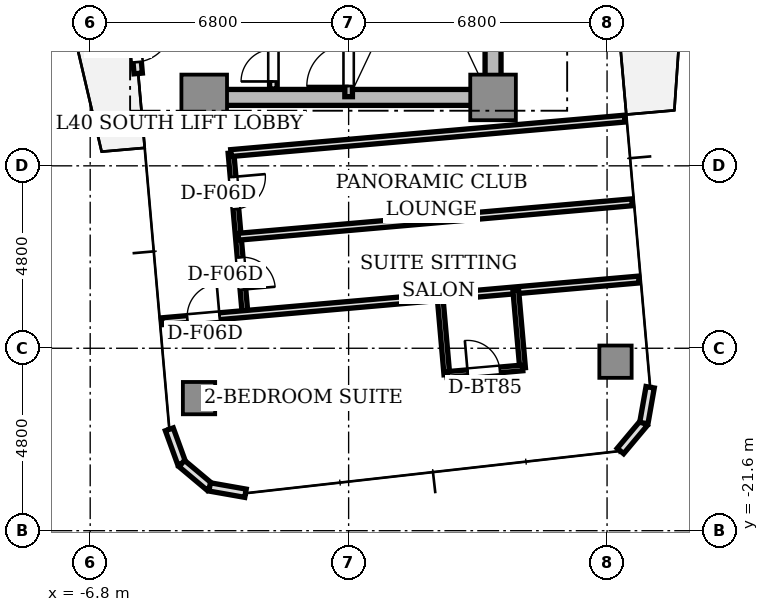
"""IFC4 building model, lengths in metres.
Left out: names, types, materials, properties, quantities, classifications, styles, units other than length and angle.
Written with IfcOpenShell. Run it as: python <this file> out.ifc"""

import sys

from ifc_helpers import new_model, si_unit, direction, frame, frame_2d, origin, origin_2d, place, context, subcontext, project, spatial, rectangle, extrude, source, transform, mapped, element, fill, save


model = new_model("IFC4")
c1 = context("Model", 3, precision=1e-05, world=origin(), true_north=direction((0.0, 1.0)))
c2 = subcontext(c1, "Body", "Model", "MODEL_VIEW")
j1 = project(units=[si_unit("LENGTHUNIT", "METRE"), si_unit("PLANEANGLEUNIT", "RADIAN")], contexts=[c1])
p1 = place(None, origin())
s1 = spatial("IfcSite", under=j1, at=p1, CompositionType="ELEMENT")
p2 = place(p1, origin())
s2 = spatial("IfcBuilding", under=s1, at=p2, CompositionType="ELEMENT")
p3 = place(p2, frame((0.0, 0.0, 147.25)))
s3 = spatial("IfcBuildingStorey", under=s2, at=p3, CompositionType="ELEMENT", Elevation=147.25)
p4 = place(p3, frame((-3.55, -10.2, 0.0), z_axis=(0.0, 0.0, 1.0), x_axis=(1.0, 0.0, 0.0)))
e1 = element("IfcWall", 1, at=p4, inside=s3, PredefinedType="SHEAR", context=c2, shape_type="SweptSolid", body=[
    extrude(rectangle(XDim=7.1, YDim=0.42, at=frame_2d((3.55, 0.0))), origin(), (0.0, 0.0, 1.0), 3.11),
])
p5 = place(p3, frame((3.8, -9.75, 0.0), z_axis=(0.0, 0.0, 1.0), x_axis=(0.0, 1.0, 0.0)))
e2 = element("IfcWall", 2, at=p5, inside=s3, PredefinedType="SHEAR", context=c2, shape_type="SweptSolid", body=[
    extrude(rectangle(XDim=6.9, YDim=0.42, at=frame_2d((3.45, 0.0))), origin(), (0.0, 0.0, 1.0), 3.11),
])
m1 = source(origin(), c2, "Body", "SweptSolid", [
    extrude(rectangle(XDim=1.2, YDim=1.2, at=origin_2d()), origin(), (0.0, 0.0, 1.0), 3.11),
])
for number, where, z_axis, x_axis in (
    (3, (-3.8, -10.2, 0.0), (0.0, 0.0, 1.0), (1.0, 0.0, 0.0)),
    (4, (3.8, -10.2, 0.0), (0.0, 0.0, 1.0), (1.0, 0.0, 0.0)),
):
    element("IfcColumn", number, at=place(p3, frame(where, z_axis=z_axis, x_axis=x_axis)), inside=s3, PredefinedType="COLUMN", context=c2, shape_type="MappedRepresentation", body=[
        mapped(m1, transform((0.0, 0.0, 0.0), scale=1.0)),
    ])
m2 = source(origin(), c2, "Body", "SweptSolid", [
    extrude(rectangle(XDim=0.85, YDim=0.85, at=origin_2d()), origin(), (0.0, 0.0, 1.0), 3.11),
])
for number, where, z_axis, x_axis in (
    (5, (-3.936, -18.112, 0.0), (0.0, 0.0, 1.0), (1.0, 0.0, 0.0)),
    (6, (7.022, -17.153, 0.0), (0.0, 0.0, 1.0), (1.0, 0.0, 0.0)),
):
    element("IfcColumn", number, at=place(p3, frame(where, z_axis=z_axis, x_axis=x_axis)), inside=s3, PredefinedType="COLUMN", context=c2, shape_type="MappedRepresentation", body=[
        mapped(m2, transform((0.0, 0.0, 0.0), scale=1.0)),
    ])
p6 = place(p3, frame((-5.772, -6.879, 0.0), z_axis=(0.0, 0.0, 1.0), x_axis=(0.087168071984, -0.996193619346, 0.0)))
e7 = element("IfcWall", 7, at=p6, inside=s3, PredefinedType="STANDARD", context=c2, shape_type="SweptSolid", body=[
    extrude(rectangle(XDim=2.7, YDim=0.22, at=frame_2d((1.35, 0.0))), origin(), (0.0, 0.0, 1.0), 3.11),
])
p7 = place(p6, frame((1.4, 0.0, 0.0)))
e8 = element("IfcOpeningElement", 8, at=p7, cuts=e7, PredefinedType="OPENING", context=c2, shape_type="SweptSolid", body=[
    extrude(rectangle(XDim=1.0, YDim=2.2, at=frame_2d((0.5, 1.1))), frame((0.0, 0.12, 0.0), z_axis=(0.0, -1.0, 0.0), x_axis=(1.0, 0.0, 0.0)), (0.0, 0.0, 1.0), 0.24),
])
p8 = place(p3, frame((-4.718, -18.933, 0.0), z_axis=(0.0, 0.0, 1.0), x_axis=(0.34188635151, -0.939741306239, 0.0)))
e9 = element("IfcWall", 9, at=p8, inside=s3, PredefinedType="STANDARD", context=c2, shape_type="SweptSolid", body=[
    extrude(rectangle(XDim=0.958, YDim=0.22, at=frame_2d((0.479, 0.0))), origin(), (0.0, 0.0, 1.0), 3.11),
])
for number, where, z_axis, x_axis in (
    (10, (-4.39, -19.833, 0.0), (0.0, 0.0, 1.0), (0.766, -0.643, 0.0)),
    (11, (-3.657, -20.449, 0.0), (0.0, 0.0, 1.0), (0.985, -0.174, 0.0)),
):
    element("IfcWall", number, at=place(p3, frame(where, z_axis=z_axis, x_axis=x_axis)), inside=s3, PredefinedType="STANDARD", context=c2, shape_type="SweptSolid", body=[
        extrude(rectangle(XDim=0.958, YDim=0.22, at=frame_2d((0.479, 0.0))), origin(), (0.0, 0.0, 1.0), 3.11),
    ])
for number, where, z_axis, x_axis in (
    (12, (7.152, -19.503, 0.0), (0.0, 0.0, 1.0), (0.643, 0.766, 0.0)),
    (13, (7.768, -18.769, 0.0), (0.0, 0.0, 1.0), (0.174, 0.985, 0.0)),
):
    element("IfcWall", number, at=place(p3, frame(where, z_axis=z_axis, x_axis=x_axis)), inside=s3, PredefinedType="STANDARD", context=c2, shape_type="SweptSolid", body=[
        extrude(rectangle(XDim=0.958, YDim=0.22, at=frame_2d((0.479, 0.0))), origin(), (0.0, 0.0, 1.0), 3.11),
    ])
p9 = place(p3, frame((0.0, -10.18, 0.0), z_axis=(0.0, 0.0, 1.0), x_axis=(0.0, 1.0, 0.0)))
e14 = element("IfcWall", 14, at=p9, inside=s3, PredefinedType="SOLIDWALL", context=c2, shape_type="SweptSolid", body=[
    extrude(rectangle(XDim=7.68, YDim=0.2, at=frame_2d((3.84, 0.0))), origin(), (0.0, 0.0, 1.0), 3.11),
])
p10 = place(p9, frame((0.28, 0.0, 0.0)))
e15 = element("IfcOpeningElement", 15, at=p10, cuts=e14, PredefinedType="OPENING", context=c2, shape_type="SweptSolid", body=[
    extrude(rectangle(XDim=1.1, YDim=2.15, at=frame_2d((0.55, 1.075))), frame((0.0, 0.11, 0.0), z_axis=(0.0, -1.0, 0.0), x_axis=(1.0, 0.0, 0.0)), (0.0, 0.0, 1.0), 0.22),
])
p11 = place(p3, frame((-1.98, -9.98, 0.0), z_axis=(0.0, 0.0, 1.0), x_axis=(0.0, 1.0, 0.0)))
e16 = element("IfcWall", 16, at=p11, inside=s3, PredefinedType="SOLIDWALL", context=c2, shape_type="SweptSolid", body=[
    extrude(rectangle(XDim=4.66, YDim=0.2, at=frame_2d((2.33, 0.0))), origin(), (0.0, 0.0, 1.0), 2.66),
])
p12 = place(p11, frame((0.2, 0.0, 0.0)))
e17 = element("IfcOpeningElement", 17, at=p12, cuts=e16, PredefinedType="OPENING", context=c2, shape_type="SweptSolid", body=[
    extrude(rectangle(XDim=0.85, YDim=2.1, at=frame_2d((0.425, 1.05))), frame((0.0, 0.11, 0.0), z_axis=(0.0, -1.0, 0.0), x_axis=(1.0, 0.0, 0.0)), (0.0, 0.0, 1.0), 0.22),
])
p13 = place(p3, frame((-3.095, -11.664, 0.0), z_axis=(0.0, 0.0, 1.0), x_axis=(0.087142722004, -0.996195837173, 0.0)))
e18 = element("IfcWall", 18, at=p13, inside=s3, PredefinedType="PARTITIONING", context=c2, shape_type="SweptSolid", body=[
    extrude(rectangle(XDim=4.25, YDim=0.15, at=frame_2d((2.125, 0.0))), origin(), (0.0, 0.0, 1.0), 2.66),
])
p14 = place(p13, frame((0.63, 0.0, 0.0)))
e19 = element("IfcOpeningElement", 19, at=p14, cuts=e18, PredefinedType="OPENING", context=c2, shape_type="SweptSolid", body=[
    extrude(rectangle(XDim=0.85, YDim=2.1, at=frame_2d((0.425, 1.05))), frame((0.0, 0.085, 0.0), z_axis=(0.0, -1.0, 0.0), x_axis=(1.0, 0.0, 0.0)), (0.0, 0.0, 1.0), 0.17),
])
p15 = place(p13, frame((2.755, 0.0, 0.0)))
e20 = element("IfcOpeningElement", 20, at=p15, cuts=e18, PredefinedType="OPENING", context=c2, shape_type="SweptSolid", body=[
    extrude(rectangle(XDim=0.85, YDim=2.1, at=frame_2d((0.425, 1.05))), frame((0.0, 0.085, 0.0), z_axis=(0.0, -1.0, 0.0), x_axis=(1.0, 0.0, 0.0)), (0.0, 0.0, 1.0), 0.17),
])
p16 = place(p3, frame((-3.095, -11.664, 0.0), z_axis=(0.0, 0.0, 1.0), x_axis=(0.996196061386, 0.087140158824, 0.0)))
e21 = element("IfcWall", 21, at=p16, inside=s3, PredefinedType="PARTITIONING", context=c2, shape_type="SweptSolid", body=[
    extrude(rectangle(XDim=10.4, YDim=0.18, at=frame_2d((5.2, 0.0))), origin(), (0.0, 0.0, 1.0), 2.66),
])
p17 = place(p3, frame((-2.903, -13.866, 0.0), z_axis=(0.0, 0.0, 1.0), x_axis=(0.996194201607, 0.087161417409, 0.0)))
e22 = element("IfcWall", 22, at=p17, inside=s3, PredefinedType="PARTITIONING", context=c2, shape_type="SweptSolid", body=[
    extrude(rectangle(XDim=10.4, YDim=0.18, at=frame_2d((5.2, 0.0))), origin(), (0.0, 0.0, 1.0), 2.66),
])
p18 = place(p3, frame((-4.917, -16.09, 0.0), z_axis=(0.0, 0.0, 1.0), x_axis=(0.996196619285, 0.087133780622, 0.0)))
e23 = element("IfcWall", 23, at=p18, inside=s3, PredefinedType="PARTITIONING", context=c2, shape_type="SweptSolid", body=[
    extrude(rectangle(XDim=12.6, YDim=0.18, at=frame_2d((6.3, 0.0))), origin(), (0.0, 0.0, 1.0), 2.66),
])
p19 = place(p18, frame((0.675, 0.0, 0.0)))
e24 = element("IfcOpeningElement", 24, at=p19, cuts=e23, PredefinedType="OPENING", context=c2, shape_type="SweptSolid", body=[
    extrude(rectangle(XDim=0.85, YDim=2.1, at=frame_2d((0.425, 1.05))), frame((0.0, 0.1, 0.0), z_axis=(0.0, -1.0, 0.0), x_axis=(1.0, 0.0, 0.0)), (0.0, 0.0, 1.0), 0.2),
])
for number, where, z_axis, x_axis in (
    (25, (4.398, -15.275, 0.0), (0.0, 0.0, 1.0), (0.087, -0.996, 0.0)),
    (26, (2.406, -15.449, 0.0), (0.0, 0.0, 1.0), (0.087, -0.996, 0.0)),
):
    element("IfcWall", number, at=place(p3, frame(where, z_axis=z_axis, x_axis=x_axis)), inside=s3, PredefinedType="PARTITIONING", context=c2, shape_type="SweptSolid", body=[
        extrude(rectangle(XDim=2.05, YDim=0.15, at=frame_2d((1.025, 0.0))), origin(), (0.0, 0.0, 1.0), 2.66),
    ])
p20 = place(p3, frame((2.584, -17.491, 0.0), z_axis=(0.0, 0.0, 1.0), x_axis=(0.99619464492, 0.087156350505, 0.0)))
e27 = element("IfcWall", 27, at=p20, inside=s3, PredefinedType="PARTITIONING", context=c2, shape_type="SweptSolid", body=[
    extrude(rectangle(XDim=2.0, YDim=0.15, at=frame_2d((1.0, 0.0))), origin(), (0.0, 0.0, 1.0), 2.63),
])
p21 = place(p20, frame((0.55, 0.0, 0.0)))
e28 = element("IfcOpeningElement", 28, at=p21, cuts=e27, PredefinedType="OPENING", context=c2, shape_type="SweptSolid", body=[
    extrude(rectangle(XDim=0.85, YDim=2.1, at=frame_2d((0.425, 1.05))), frame((0.0, 0.085, 0.0), z_axis=(0.0, -1.0, 0.0), x_axis=(1.0, 0.0, 0.0)), (0.0, 0.0, 1.0), 0.17),
])
m3 = source(origin(), c2, "Body", "SweptSolid", [
    extrude(rectangle(XDim=1.0, YDim=0.05, at=origin_2d()), origin(), (0.0, 0.0, 1.0), 2.2),
])
p22 = place(p7, frame((0.5, 0.0, 0.0)))
e29 = element("IfcDoor", 29, at=p22, inside=s3, OperationType="SINGLE_SWING_LEFT", PredefinedType="DOOR", context=c2, shape_type="MappedRepresentation", body=[
    mapped(m3, transform((0.0, 0.0, 0.0), scale=1.0)),
])
fill(e8, e29)
m4 = source(origin(), c2, "Body", "SweptSolid", [
    extrude(rectangle(XDim=1.1, YDim=0.05, at=origin_2d()), origin(), (0.0, 0.0, 1.0), 2.15),
])
p23 = place(p10, frame((0.55, 0.0, 0.0)))
e30 = element("IfcDoor", 30, at=p23, inside=s3, OperationType="SINGLE_SWING_LEFT", PredefinedType="DOOR", context=c2, shape_type="MappedRepresentation", body=[
    mapped(m4, transform((0.0, 0.0, 0.0), scale=1.0)),
])
fill(e15, e30)
m5 = source(origin(), c2, "Body", "SweptSolid", [
    extrude(rectangle(XDim=0.85, YDim=0.05, at=origin_2d()), origin(), (0.0, 0.0, 1.0), 2.1),
])
p24 = place(p12, frame((0.425, 0.0, 0.0)))
e31 = element("IfcDoor", 31, at=p24, inside=s3, OperationType="SINGLE_SWING_LEFT", PredefinedType="DOOR", context=c2, shape_type="MappedRepresentation", body=[
    mapped(m5, transform((0.0, 0.0, 0.0), scale=1.0)),
])
fill(e17, e31)
p25 = place(p14, frame((0.425, 0.0, 0.0)))
e32 = element("IfcDoor", 32, at=p25, inside=s3, OperationType="SINGLE_SWING_LEFT", PredefinedType="DOOR", context=c2, shape_type="MappedRepresentation", body=[
    mapped(m5, transform((0.0, 0.0, 0.0), scale=1.0)),
])
fill(e19, e32)
p26 = place(p15, frame((0.425, 0.0, 0.0)))
e33 = element("IfcDoor", 33, at=p26, inside=s3, OperationType="SINGLE_SWING_RIGHT", PredefinedType="DOOR", context=c2, shape_type="MappedRepresentation", body=[
    mapped(m5, transform((0.0, 0.0, 0.0), scale=1.0)),
])
fill(e20, e33)
p27 = place(p21, frame((0.425, 0.0, 0.0)))
e34 = element("IfcDoor", 34, at=p27, inside=s3, OperationType="SINGLE_SWING_LEFT", PredefinedType="DOOR", context=c2, shape_type="MappedRepresentation", body=[
    mapped(m5, transform((0.0, 0.0, 0.0), scale=1.0)),
])
fill(e28, e34)
p28 = place(p19, frame((0.425, 0.0, 0.0)))
e35 = element("IfcDoor", 35, at=p28, inside=s3, OperationType="SINGLE_SWING_RIGHT", PredefinedType="DOOR", context=c2, shape_type="MappedRepresentation", body=[
    mapped(m5, transform((0.0, 0.0, 0.0), scale=1.0)),
])
fill(e24, e35)
save(model, sys.argv[1])
